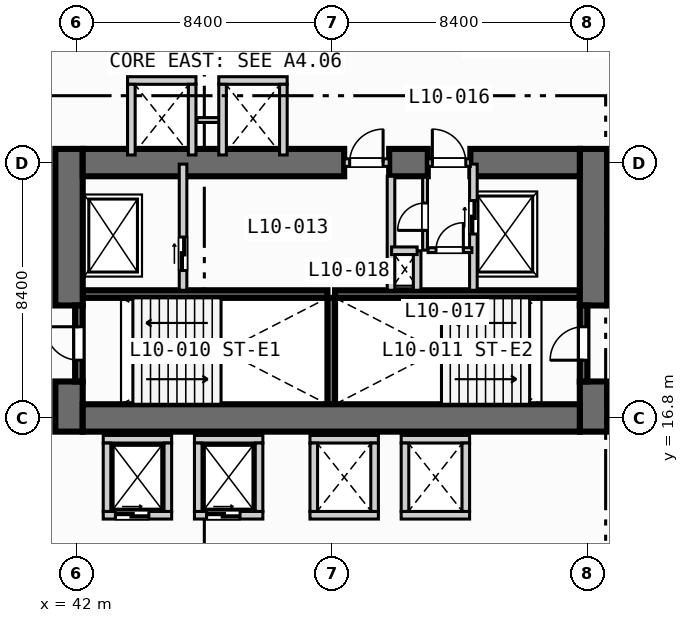
"""IFC4 building model, lengths in metres.
Left out: names, types, materials, properties, quantities, classifications, styles, units other than length and angle.
Written with IfcOpenShell. Run it as: python <this file> out.ifc"""

import sys

from ifc_helpers import new_model, si_unit, direction, frame, frame_2d, origin, place, context, subcontext, project, spatial, rectangle, extrude, element, fill, save


model = new_model("IFC4")
c1 = context("Model", 3, precision=1e-05, world=origin(), true_north=direction((0.0, 1.0)))
c2 = subcontext(c1, "Body", "Model", "MODEL_VIEW")
j1 = project(units=[si_unit("LENGTHUNIT", "METRE"), si_unit("PLANEANGLEUNIT", "RADIAN")], contexts=[c1])
p1 = place(None, origin())
s1 = spatial("IfcSite", under=j1, at=p1, CompositionType="ELEMENT")
p2 = place(p1, origin())
s2 = spatial("IfcBuilding", under=s1, at=p2, CompositionType="ELEMENT")
p3 = place(p2, frame((0.0, 0.0, 47.2)))
s3 = spatial("IfcBuildingStorey", under=s2, at=p3, CompositionType="ELEMENT", Elevation=47.2)
for number, where, z_axis, x_axis in (
    (1, (42.2, 20.875, 0.0), (0.0, 0.0, 1.0), (1.0, 0.0, 0.0)),
    (2, (50.5, 20.875, 0.0), (0.0, 0.0, 1.0), (1.0, 0.0, 0.0)),
):
    element("IfcWall", number, at=place(p3, frame(where, z_axis=z_axis, x_axis=x_axis)), inside=s3, PredefinedType="SOLIDWALL", context=c2, shape_type="SweptSolid", body=[
        extrude(rectangle(XDim=8.05, YDim=0.25, at=frame_2d((4.025, 0.0))), origin(), (0.0, 0.0, 1.0), 3.55),
    ])
p4 = place(p3, frame((50.375, 17.25, 0.0), z_axis=(0.0, 0.0, 1.0), x_axis=(0.0, 1.0, 0.0)))
e3 = element("IfcWall", 3, at=p4, inside=s3, PredefinedType="SOLIDWALL", context=c2, shape_type="SweptSolid", body=[
    extrude(rectangle(XDim=3.5, YDim=0.25, at=frame_2d((1.75, 0.0))), origin(), (0.0, 0.0, 1.0), 3.55),
])
p5 = place(p3, frame((41.75, 16.35, 0.0), z_axis=(0.0, 0.0, 1.0), x_axis=(0.0, 1.0, 0.0)))
e4 = element("IfcWall", 4, at=p5, inside=s3, PredefinedType="SHEAR", context=c2, shape_type="SweptSolid", body=[
    extrude(rectangle(XDim=1.65, YDim=0.9, at=frame_2d((0.825, 0.0))), origin(), (0.0, 0.0, 1.0), 3.55),
])
p6 = place(p3, frame((41.75, 20.5, 0.0), z_axis=(0.0, 0.0, 1.0), x_axis=(0.0, 1.0, 0.0)))
e5 = element("IfcWall", 5, at=p6, inside=s3, PredefinedType="SHEAR", context=c2, shape_type="SweptSolid", body=[
    extrude(rectangle(XDim=5.15, YDim=0.9, at=frame_2d((2.575, 0.0))), origin(), (0.0, 0.0, 1.0), 3.55),
])
p7 = place(p3, frame((59.0, 16.35, 0.0), z_axis=(0.0, 0.0, 1.0), x_axis=(0.0, 1.0, 0.0)))
e6 = element("IfcWall", 6, at=p7, inside=s3, PredefinedType="SHEAR", context=c2, shape_type="SweptSolid", body=[
    extrude(rectangle(XDim=1.65, YDim=0.9, at=frame_2d((0.825, 0.0))), origin(), (0.0, 0.0, 1.0), 3.55),
])
p8 = place(p3, frame((59.0, 20.5, 0.0), z_axis=(0.0, 0.0, 1.0), x_axis=(0.0, 1.0, 0.0)))
e7 = element("IfcWall", 7, at=p8, inside=s3, PredefinedType="SHEAR", context=c2, shape_type="SweptSolid", body=[
    extrude(rectangle(XDim=5.15, YDim=0.9, at=frame_2d((2.575, 0.0))), origin(), (0.0, 0.0, 1.0), 3.55),
])
p9 = place(p3, frame((42.2, 16.8, 0.0), z_axis=(0.0, 0.0, 1.0), x_axis=(1.0, 0.0, 0.0)))
e8 = element("IfcWall", 8, at=p9, inside=s3, PredefinedType="SHEAR", context=c2, shape_type="SweptSolid", body=[
    extrude(rectangle(XDim=16.35, YDim=0.9, at=frame_2d((8.175, 0.0))), origin(), (0.0, 0.0, 1.0), 3.55),
])
p10 = place(p3, frame((42.2, 25.2, 0.0), z_axis=(0.0, 0.0, 1.0), x_axis=(1.0, 0.0, 0.0)))
e9 = element("IfcWall", 9, at=p10, inside=s3, PredefinedType="SHEAR", context=c2, shape_type="SweptSolid", body=[
    extrude(rectangle(XDim=8.6, YDim=0.9, at=frame_2d((4.3, 0.0))), origin(), (0.0, 0.0, 1.0), 3.55),
])
p11 = place(p3, frame((52.28, 25.2, 0.0), z_axis=(0.0, 0.0, 1.0), x_axis=(1.0, 0.0, 0.0)))
e10 = element("IfcWall", 10, at=p11, inside=s3, PredefinedType="SHEAR", context=c2, shape_type="SweptSolid", body=[
    extrude(rectangle(XDim=1.27, YDim=0.9, at=frame_2d((0.635, 0.0))), origin(), (0.0, 0.0, 1.0), 3.55),
])
p12 = place(p3, frame((54.95, 25.2, 0.0), z_axis=(0.0, 0.0, 1.0), x_axis=(1.0, 0.0, 0.0)))
e11 = element("IfcWall", 11, at=p12, inside=s3, PredefinedType="SHEAR", context=c2, shape_type="SweptSolid", body=[
    extrude(rectangle(XDim=3.6, YDim=0.9, at=frame_2d((1.8, 0.0))), origin(), (0.0, 0.0, 1.0), 3.55),
])
p13 = place(p3, frame((42.075, 18.0, 0.0), z_axis=(0.0, 0.0, 1.0), x_axis=(0.0, 1.0, 0.0)))
e12 = element("IfcWall", 12, at=p13, inside=s3, PredefinedType="SOLIDWALL", context=c2, shape_type="SweptSolid", body=[
    extrude(rectangle(XDim=2.5, YDim=0.25, at=frame_2d((1.25, 0.0))), origin(), (0.0, 0.0, 1.0), 3.55),
])
p14 = place(p13, frame((0.7, 0.0, 0.0)))
e13 = element("IfcOpeningElement", 13, at=p14, cuts=e12, PredefinedType="OPENING", context=c2, shape_type="SweptSolid", body=[
    extrude(rectangle(XDim=1.1, YDim=2.15, at=frame_2d((0.55, 1.075))), frame((0.0, 0.135, 0.0), z_axis=(0.0, -1.0, 0.0), x_axis=(1.0, 0.0, 0.0)), (0.0, 0.0, 1.0), 0.27),
])
p15 = place(p3, frame((58.675, 18.0, 0.0), z_axis=(0.0, 0.0, 1.0), x_axis=(0.0, 1.0, 0.0)))
e14 = element("IfcWall", 14, at=p15, inside=s3, PredefinedType="SOLIDWALL", context=c2, shape_type="SweptSolid", body=[
    extrude(rectangle(XDim=2.5, YDim=0.25, at=frame_2d((1.25, 0.0))), origin(), (0.0, 0.0, 1.0), 3.55),
])
p16 = place(p15, frame((0.7, 0.0, 0.0)))
e15 = element("IfcOpeningElement", 15, at=p16, cuts=e14, PredefinedType="OPENING", context=c2, shape_type="SweptSolid", body=[
    extrude(rectangle(XDim=1.1, YDim=2.15, at=frame_2d((0.55, 1.075))), frame((0.0, 0.135, 0.0), z_axis=(0.0, -1.0, 0.0), x_axis=(1.0, 0.0, 0.0)), (0.0, 0.0, 1.0), 0.27),
])
p17 = place(p3, frame((45.5, 21.0, 0.0), z_axis=(0.0, 0.0, 1.0), x_axis=(0.0, 1.0, 0.0)))
e16 = element("IfcWall", 16, at=p17, inside=s3, PredefinedType="SOLIDWALL", context=c2, shape_type="SweptSolid", body=[
    extrude(rectangle(XDim=4.15, YDim=0.25, at=frame_2d((2.075, 0.0))), origin(), (0.0, 0.0, 1.0), 3.55),
])
p18 = place(p17, frame((0.65, 0.0, 0.0)))
e17 = element("IfcOpeningElement", 17, at=p18, cuts=e16, PredefinedType="OPENING", context=c2, shape_type="SweptSolid", body=[
    extrude(rectangle(XDim=1.1, YDim=2.15, at=frame_2d((0.55, 1.075))), frame((0.0, 0.135, 0.0), z_axis=(0.0, -1.0, 0.0), x_axis=(1.0, 0.0, 0.0)), (0.0, 0.0, 1.0), 0.27),
])
p19 = place(p3, frame((50.8, 25.2, 0.0), z_axis=(0.0, 0.0, 1.0), x_axis=(1.0, 0.0, 0.0)))
e18 = element("IfcWall", 18, at=p19, inside=s3, PredefinedType="SOLIDWALL", context=c2, shape_type="SweptSolid", body=[
    extrude(rectangle(XDim=1.48, YDim=0.25, at=frame_2d((0.74, 0.0))), origin(), (0.0, 0.0, 1.0), 3.55),
])
p20 = place(p19, frame((0.18, 0.0, 0.0)))
e19 = element("IfcOpeningElement", 19, at=p20, cuts=e18, PredefinedType="OPENING", context=c2, shape_type="SweptSolid", body=[
    extrude(rectangle(XDim=1.1, YDim=2.15, at=frame_2d((0.55, 1.075))), frame((0.0, 0.135, 0.0), z_axis=(0.0, -1.0, 0.0), x_axis=(1.0, 0.0, 0.0)), (0.0, 0.0, 1.0), 0.27),
])
p21 = place(p3, frame((52.34, 21.0, 0.0), z_axis=(0.0, 0.0, 1.0), x_axis=(0.0, 1.0, 0.0)))
e20 = element("IfcWall", 20, at=p21, inside=s3, PredefinedType="SOLIDWALL", context=c2, shape_type="SweptSolid", body=[
    extrude(rectangle(XDim=3.75, YDim=0.25, at=frame_2d((1.875, 0.0))), origin(), (0.0, 0.0, 1.0), 3.55),
])
p22 = place(p3, frame((55.05, 21.0, 0.0), z_axis=(0.0, 0.0, 1.0), x_axis=(0.0, 1.0, 0.0)))
e21 = element("IfcWall", 21, at=p22, inside=s3, PredefinedType="SOLIDWALL", context=c2, shape_type="SweptSolid", body=[
    extrude(rectangle(XDim=4.15, YDim=0.25, at=frame_2d((2.075, 0.0))), origin(), (0.0, 0.0, 1.0), 3.55),
])
p23 = place(p22, frame((1.85, 0.0, 0.0)))
e22 = element("IfcOpeningElement", 22, at=p23, cuts=e21, PredefinedType="OPENING", context=c2, shape_type="SweptSolid", body=[
    extrude(rectangle(XDim=1.1, YDim=2.15, at=frame_2d((0.55, 1.075))), frame((0.0, 0.135, 0.0), z_axis=(0.0, -1.0, 0.0), x_axis=(1.0, 0.0, 0.0)), (0.0, 0.0, 1.0), 0.27),
])
p24 = place(p3, frame((53.55, 25.2, 0.0), z_axis=(0.0, 0.0, 1.0), x_axis=(1.0, 0.0, 0.0)))
e23 = element("IfcWall", 23, at=p24, inside=s3, PredefinedType="SOLIDWALL", context=c2, shape_type="SweptSolid", body=[
    extrude(rectangle(XDim=1.4, YDim=0.25, at=frame_2d((0.7, 0.0))), origin(), (0.0, 0.0, 1.0), 3.55),
])
p25 = place(p24, frame((0.15, 0.0, 0.0)))
e24 = element("IfcOpeningElement", 24, at=p25, cuts=e23, PredefinedType="OPENING", context=c2, shape_type="SweptSolid", body=[
    extrude(rectangle(XDim=1.1, YDim=2.15, at=frame_2d((0.55, 1.075))), frame((0.0, 0.135, 0.0), z_axis=(0.0, -1.0, 0.0), x_axis=(1.0, 0.0, 0.0)), (0.0, 0.0, 1.0), 0.27),
])
p26 = place(p3, frame((53.2, 21.0, 0.0), z_axis=(0.0, 0.0, 1.0), x_axis=(0.0, 1.0, 0.0)))
e25 = element("IfcWall", 25, at=p26, inside=s3, PredefinedType="SOLIDWALL", context=c2, shape_type="SweptSolid", body=[
    extrude(rectangle(XDim=1.3, YDim=0.25, at=frame_2d((0.65, 0.0))), origin(), (0.0, 0.0, 1.0), 3.55),
])
p27 = place(p3, frame((52.36, 22.3, 0.0), z_axis=(0.0, 0.0, 1.0), x_axis=(1.0, 0.0, 0.0)))
e26 = element("IfcWall", 26, at=p27, inside=s3, PredefinedType="SOLIDWALL", context=c2, shape_type="SweptSolid", body=[
    extrude(rectangle(XDim=0.84, YDim=0.25, at=frame_2d((0.42, 0.0))), origin(), (0.0, 0.0, 1.0), 3.55),
])
p28 = place(p3, frame((53.56, 22.32, 0.0), z_axis=(0.0, 0.0, 1.0), x_axis=(1.0, 0.0, 0.0)))
e27 = element("IfcWall", 27, at=p28, inside=s3, PredefinedType="PARTITIONING", context=c2, shape_type="SweptSolid", body=[
    extrude(rectangle(XDim=1.44, YDim=0.16, at=frame_2d((0.72, 0.0))), origin(), (0.0, 0.0, 1.0), 3.55),
])
p29 = place(p28, frame((0.26, 0.0, 0.0)))
e28 = element("IfcOpeningElement", 28, at=p29, cuts=e27, PredefinedType="OPENING", context=c2, shape_type="SweptSolid", body=[
    extrude(rectangle(XDim=0.9, YDim=2.1, at=frame_2d((0.45, 1.05))), frame((0.0, 0.09, 0.0), z_axis=(0.0, -1.0, 0.0), x_axis=(1.0, 0.0, 0.0)), (0.0, 0.0, 1.0), 0.18),
])
p30 = place(p3, frame((53.46, 22.32, 0.0), z_axis=(0.0, 0.0, 1.0), x_axis=(0.0, 1.0, 0.0)))
e29 = element("IfcWall", 29, at=p30, inside=s3, PredefinedType="PARTITIONING", context=c2, shape_type="SweptSolid", body=[
    extrude(rectangle(XDim=2.4, YDim=0.16, at=frame_2d((1.2, 0.0))), origin(), (0.0, 0.0, 1.0), 3.55),
])
p31 = place(p30, frame((0.65, 0.0, 0.0)))
e30 = element("IfcOpeningElement", 30, at=p31, cuts=e29, PredefinedType="OPENING", context=c2, shape_type="SweptSolid", body=[
    extrude(rectangle(XDim=0.9, YDim=2.1, at=frame_2d((0.45, 1.05))), frame((0.0, 0.09, 0.0), z_axis=(0.0, -1.0, 0.0), x_axis=(1.0, 0.0, 0.0)), (0.0, 0.0, 1.0), 0.18),
])
p32 = place(p3, frame((42.875, 13.6, 0.0), z_axis=(0.0, 0.0, 1.0), x_axis=(1.0, 0.0, 0.0)))
e31 = element("IfcWall", 31, at=p32, inside=s3, PredefinedType="SOLIDWALL", context=c2, shape_type="SweptSolid", body=[
    extrude(rectangle(XDim=2.25, YDim=0.25, at=frame_2d((1.125, 0.0))), origin(), (0.0, 0.0, 1.0), 3.55),
])
p33 = place(p32, frame((0.4, 0.0, 0.0)))
e32 = element("IfcOpeningElement", 32, at=p33, cuts=e31, PredefinedType="OPENING", context=c2, shape_type="SweptSolid", body=[
    extrude(rectangle(XDim=1.1, YDim=2.15, at=frame_2d((0.55, 1.075))), frame((0.0, 0.135, 0.0), z_axis=(0.0, -1.0, 0.0), x_axis=(1.0, 0.0, 0.0)), (0.0, 0.0, 1.0), 0.27),
])
for number, where, z_axis, x_axis in (
    (33, (42.875, 16.1, 0.0), (0.0, 0.0, 1.0), (1.0, 0.0, 0.0)),
    (34, (43.0, 13.725, 0.0), (0.0, 0.0, 1.0), (0.0, 1.0, 0.0)),
    (35, (45.0, 13.725, 0.0), (0.0, 0.0, 1.0), (0.0, 1.0, 0.0)),
):
    element("IfcWall", number, at=place(p3, frame(where, z_axis=z_axis, x_axis=x_axis)), inside=s3, PredefinedType="SOLIDWALL", context=c2, shape_type="SweptSolid", body=[
        extrude(rectangle(XDim=2.25, YDim=0.25, at=frame_2d((1.125, 0.0))), origin(), (0.0, 0.0, 1.0), 3.55),
    ])
p34 = place(p3, frame((45.875, 13.6, 0.0), z_axis=(0.0, 0.0, 1.0), x_axis=(1.0, 0.0, 0.0)))
e36 = element("IfcWall", 36, at=p34, inside=s3, PredefinedType="SOLIDWALL", context=c2, shape_type="SweptSolid", body=[
    extrude(rectangle(XDim=2.25, YDim=0.25, at=frame_2d((1.125, 0.0))), origin(), (0.0, 0.0, 1.0), 3.55),
])
p35 = place(p34, frame((0.4, 0.0, 0.0)))
e37 = element("IfcOpeningElement", 37, at=p35, cuts=e36, PredefinedType="OPENING", context=c2, shape_type="SweptSolid", body=[
    extrude(rectangle(XDim=1.1, YDim=2.15, at=frame_2d((0.55, 1.075))), frame((0.0, 0.135, 0.0), z_axis=(0.0, -1.0, 0.0), x_axis=(1.0, 0.0, 0.0)), (0.0, 0.0, 1.0), 0.27),
])
for number, where, z_axis, x_axis in (
    (38, (45.875, 16.1, 0.0), (0.0, 0.0, 1.0), (1.0, 0.0, 0.0)),
    (39, (46.0, 13.725, 0.0), (0.0, 0.0, 1.0), (0.0, 1.0, 0.0)),
    (40, (48.0, 13.725, 0.0), (0.0, 0.0, 1.0), (0.0, 1.0, 0.0)),
    (41, (49.675, 13.6, 0.0), (0.0, 0.0, 1.0), (1.0, 0.0, 0.0)),
    (42, (49.675, 16.1, 0.0), (0.0, 0.0, 1.0), (1.0, 0.0, 0.0)),
    (43, (49.8, 13.725, 0.0), (0.0, 0.0, 1.0), (0.0, 1.0, 0.0)),
    (44, (51.8, 13.725, 0.0), (0.0, 0.0, 1.0), (0.0, 1.0, 0.0)),
    (45, (52.675, 13.6, 0.0), (0.0, 0.0, 1.0), (1.0, 0.0, 0.0)),
    (46, (52.675, 16.1, 0.0), (0.0, 0.0, 1.0), (1.0, 0.0, 0.0)),
    (47, (52.8, 13.725, 0.0), (0.0, 0.0, 1.0), (0.0, 1.0, 0.0)),
    (48, (54.8, 13.725, 0.0), (0.0, 0.0, 1.0), (0.0, 1.0, 0.0)),
    (49, (43.675, 27.9, 0.0), (0.0, 0.0, 1.0), (1.0, 0.0, 0.0)),
):
    element("IfcWall", number, at=place(p3, frame(where, z_axis=z_axis, x_axis=x_axis)), inside=s3, PredefinedType="SOLIDWALL", context=c2, shape_type="SweptSolid", body=[
        extrude(rectangle(XDim=2.25, YDim=0.25, at=frame_2d((1.125, 0.0))), origin(), (0.0, 0.0, 1.0), 3.55),
    ])
for number, where, z_axis, x_axis in (
    (50, (43.8, 25.45, 0.0), (0.0, 0.0, 1.0), (0.0, 1.0, 0.0)),
    (51, (45.8, 25.45, 0.0), (0.0, 0.0, 1.0), (0.0, 1.0, 0.0)),
):
    element("IfcWall", number, at=place(p3, frame(where, z_axis=z_axis, x_axis=x_axis)), inside=s3, PredefinedType="SOLIDWALL", context=c2, shape_type="SweptSolid", body=[
        extrude(rectangle(XDim=2.325, YDim=0.25, at=frame_2d((1.163, 0.0))), origin(), (0.0, 0.0, 1.0), 3.55),
    ])
p36 = place(p3, frame((45.96, 26.6, 0.0), z_axis=(0.0, 0.0, 1.0), x_axis=(1.0, 0.0, 0.0)))
e52 = element("IfcWall", 52, at=p36, inside=s3, PredefinedType="PARTITIONING", context=c2, shape_type="SweptSolid", body=[
    extrude(rectangle(XDim=0.88, YDim=0.16, at=frame_2d((0.44, 0.0))), origin(), (0.0, 0.0, 1.0), 3.55),
])
p37 = place(p3, frame((46.675, 27.9, 0.0), z_axis=(0.0, 0.0, 1.0), x_axis=(1.0, 0.0, 0.0)))
e53 = element("IfcWall", 53, at=p37, inside=s3, PredefinedType="SOLIDWALL", context=c2, shape_type="SweptSolid", body=[
    extrude(rectangle(XDim=2.25, YDim=0.25, at=frame_2d((1.125, 0.0))), origin(), (0.0, 0.0, 1.0), 3.55),
])
for number, where, z_axis, x_axis in (
    (54, (46.8, 25.45, 0.0), (0.0, 0.0, 1.0), (0.0, 1.0, 0.0)),
    (55, (48.8, 25.45, 0.0), (0.0, 0.0, 1.0), (0.0, 1.0, 0.0)),
):
    element("IfcWall", number, at=place(p3, frame(where, z_axis=z_axis, x_axis=x_axis)), inside=s3, PredefinedType="SOLIDWALL", context=c2, shape_type="SweptSolid", body=[
        extrude(rectangle(XDim=2.325, YDim=0.25, at=frame_2d((1.163, 0.0))), origin(), (0.0, 0.0, 1.0), 3.55),
    ])
p38 = place(p14, origin())
e56 = element("IfcDoor", 56, at=p38, inside=s3, OperationType="SINGLE_SWING_RIGHT", PredefinedType="DOOR", context=c2, shape_type="SweptSolid", body=[
    extrude(rectangle(XDim=1.1, YDim=2.15, at=frame_2d((0.55, 1.075))), frame((0.0, 0.025, 0.0), z_axis=(0.0, -1.0, 0.0), x_axis=(1.0, 0.0, 0.0)), (0.0, 0.0, 1.0), 0.05),
])
fill(e13, e56)
p39 = place(p16, origin())
e57 = element("IfcDoor", 57, at=p39, inside=s3, OperationType="SINGLE_SWING_LEFT", PredefinedType="DOOR", context=c2, shape_type="SweptSolid", body=[
    extrude(rectangle(XDim=1.1, YDim=2.15, at=frame_2d((0.55, 1.075))), frame((0.0, 0.025, 0.0), z_axis=(0.0, -1.0, 0.0), x_axis=(1.0, 0.0, 0.0)), (0.0, 0.0, 1.0), 0.05),
])
fill(e15, e57)
p40 = place(p18, origin())
e58 = element("IfcDoor", 58, at=p40, inside=s3, OperationType="SLIDING_TO_LEFT", PredefinedType="DOOR", context=c2, shape_type="SweptSolid", body=[
    extrude(rectangle(XDim=1.1, YDim=2.15, at=frame_2d((0.55, 1.075))), frame((0.0, 0.025, 0.0), z_axis=(0.0, -1.0, 0.0), x_axis=(1.0, 0.0, 0.0)), (0.0, 0.0, 1.0), 0.05),
])
fill(e17, e58)
p41 = place(p20, origin())
e59 = element("IfcDoor", 59, at=p41, inside=s3, OperationType="SINGLE_SWING_RIGHT", PredefinedType="DOOR", context=c2, shape_type="SweptSolid", body=[
    extrude(rectangle(XDim=1.1, YDim=2.15, at=frame_2d((0.55, 1.075))), frame((0.0, 0.025, 0.0), z_axis=(0.0, -1.0, 0.0), x_axis=(1.0, 0.0, 0.0)), (0.0, 0.0, 1.0), 0.05),
])
fill(e19, e59)
p42 = place(p23, origin())
e60 = element("IfcDoor", 60, at=p42, inside=s3, OperationType="SLIDING_TO_LEFT", PredefinedType="DOOR", context=c2, shape_type="SweptSolid", body=[
    extrude(rectangle(XDim=1.1, YDim=2.15, at=frame_2d((0.55, 1.075))), frame((0.0, 0.025, 0.0), z_axis=(0.0, -1.0, 0.0), x_axis=(1.0, 0.0, 0.0)), (0.0, 0.0, 1.0), 0.05),
])
fill(e22, e60)
p43 = place(p25, origin())
e61 = element("IfcDoor", 61, at=p43, inside=s3, OperationType="SINGLE_SWING_LEFT", PredefinedType="DOOR", context=c2, shape_type="SweptSolid", body=[
    extrude(rectangle(XDim=1.1, YDim=2.15, at=frame_2d((0.55, 1.075))), frame((0.0, 0.025, 0.0), z_axis=(0.0, -1.0, 0.0), x_axis=(1.0, 0.0, 0.0)), (0.0, 0.0, 1.0), 0.05),
])
fill(e24, e61)
p44 = place(p29, origin())
e62 = element("IfcDoor", 62, at=p44, inside=s3, OperationType="SINGLE_SWING_RIGHT", PredefinedType="DOOR", context=c2, shape_type="SweptSolid", body=[
    extrude(rectangle(XDim=0.9, YDim=2.1, at=frame_2d((0.45, 1.05))), frame((0.0, 0.025, 0.0), z_axis=(0.0, -1.0, 0.0), x_axis=(1.0, 0.0, 0.0)), (0.0, 0.0, 1.0), 0.05),
])
fill(e28, e62)
p45 = place(p31, origin())
e63 = element("IfcDoor", 63, at=p45, inside=s3, OperationType="SINGLE_SWING_LEFT", PredefinedType="DOOR", context=c2, shape_type="SweptSolid", body=[
    extrude(rectangle(XDim=0.9, YDim=2.1, at=frame_2d((0.45, 1.05))), frame((0.0, 0.025, 0.0), z_axis=(0.0, -1.0, 0.0), x_axis=(1.0, 0.0, 0.0)), (0.0, 0.0, 1.0), 0.05),
])
fill(e30, e63)
p46 = place(p33, origin())
e64 = element("IfcDoor", 64, at=p46, inside=s3, OperationType="SLIDING_TO_LEFT", PredefinedType="DOOR", context=c2, shape_type="SweptSolid", body=[
    extrude(rectangle(XDim=1.1, YDim=2.15, at=frame_2d((0.55, 1.075))), frame((0.0, 0.025, 0.0), z_axis=(0.0, -1.0, 0.0), x_axis=(1.0, 0.0, 0.0)), (0.0, 0.0, 1.0), 0.05),
])
fill(e32, e64)
p47 = place(p35, origin())
e65 = element("IfcDoor", 65, at=p47, inside=s3, OperationType="SLIDING_TO_LEFT", PredefinedType="DOOR", context=c2, shape_type="SweptSolid", body=[
    extrude(rectangle(XDim=1.1, YDim=2.15, at=frame_2d((0.55, 1.075))), frame((0.0, 0.025, 0.0), z_axis=(0.0, -1.0, 0.0), x_axis=(1.0, 0.0, 0.0)), (0.0, 0.0, 1.0), 0.05),
])
fill(e37, e65)
save(model, sys.argv[1])
